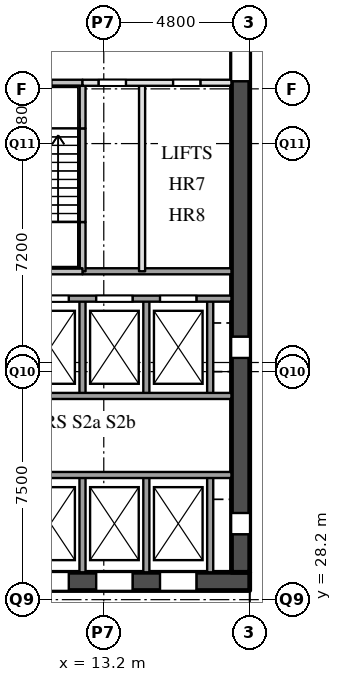
"""IFC4 building model, lengths in metres.
Left out: names, types, materials, properties, quantities, classifications, styles, units other than length and angle.
Written with IfcOpenShell. Run it as: python <this file> out.ifc"""

import sys

from ifc_helpers import new_model, si_unit, direction, frame, frame_2d, origin, place, context, subcontext, project, spatial, rectangle, extrude, element, fill, save


model = new_model("IFC4")
c1 = context("Model", 3, precision=1e-05, world=origin(), true_north=direction((0.0, 1.0)))
c2 = subcontext(c1, "Body", "Model", "MODEL_VIEW")
j1 = project(units=[si_unit("LENGTHUNIT", "METRE"), si_unit("PLANEANGLEUNIT", "RADIAN")], contexts=[c1])
p1 = place(None, origin())
s1 = spatial("IfcSite", under=j1, at=p1, CompositionType="ELEMENT")
p2 = place(p1, origin())
s2 = spatial("IfcBuilding", under=s1, at=p2, CompositionType="ELEMENT")
p3 = place(p2, origin())
s3 = spatial("IfcBuildingStorey", under=s2, at=p3, CompositionType="ELEMENT", Elevation=0.0)
p4 = place(p3, frame((5.6, 28.8, 0.0), z_axis=(0.0, 0.0, 1.0), x_axis=(1.0, 0.0, 0.0)))
e1 = element("IfcWall", 1, at=p4, inside=s3, PredefinedType="SHEAR", context=c2, shape_type="SweptSolid", body=[
    extrude(rectangle(XDim=12.4, YDim=0.6, at=frame_2d((6.2, 0.0))), origin(), (0.0, 0.0, 1.0), 7.59),
])
p5 = place(p4, frame((1.05, 0.0, 0.0)))
e2 = element("IfcOpeningElement", 2, at=p5, cuts=e1, PredefinedType="OPENING", context=c2, shape_type="SweptSolid", body=[
    extrude(rectangle(XDim=1.2, YDim=2.1, at=frame_2d((0.6, 1.05))), frame((0.0, 0.31, 0.0), z_axis=(0.0, -1.0, 0.0), x_axis=(1.0, 0.0, 0.0)), (0.0, 0.0, 1.0), 0.62),
])
p6 = place(p4, frame((5.25, 0.0, 0.0)))
e3 = element("IfcOpeningElement", 3, at=p6, cuts=e1, PredefinedType="OPENING", context=c2, shape_type="SweptSolid", body=[
    extrude(rectangle(XDim=1.2, YDim=2.1, at=frame_2d((0.6, 1.05))), frame((0.0, 0.31, 0.0), z_axis=(0.0, -1.0, 0.0), x_axis=(1.0, 0.0, 0.0)), (0.0, 0.0, 1.0), 0.62),
])
p7 = place(p4, frame((7.35, 0.0, 0.0)))
e4 = element("IfcOpeningElement", 4, at=p7, cuts=e1, PredefinedType="OPENING", context=c2, shape_type="SweptSolid", body=[
    extrude(rectangle(XDim=1.2, YDim=2.1, at=frame_2d((0.6, 1.05))), frame((0.0, 0.31, 0.0), z_axis=(0.0, -1.0, 0.0), x_axis=(1.0, 0.0, 0.0)), (0.0, 0.0, 1.0), 0.62),
])
p8 = place(p4, frame((9.45, 0.0, 0.0)))
e5 = element("IfcOpeningElement", 5, at=p8, cuts=e1, PredefinedType="OPENING", context=c2, shape_type="SweptSolid", body=[
    extrude(rectangle(XDim=1.2, YDim=2.1, at=frame_2d((0.6, 1.05))), frame((0.0, 0.31, 0.0), z_axis=(0.0, -1.0, 0.0), x_axis=(1.0, 0.0, 0.0)), (0.0, 0.0, 1.0), 0.62),
])
p9 = place(p3, frame((17.7, 29.1, 0.0), z_axis=(0.0, 0.0, 1.0), x_axis=(0.0, 1.0, 0.0)))
e6 = element("IfcWall", 6, at=p9, inside=s3, PredefinedType="SHEAR", context=c2, shape_type="SweptSolid", body=[
    extrude(rectangle(XDim=20.3, YDim=0.6, at=frame_2d((10.15, 0.0))), origin(), (0.0, 0.0, 1.0), 7.59),
])
p10 = place(p9, frame((1.25, 0.0, 0.0)))
e7 = element("IfcOpeningElement", 7, at=p10, cuts=e6, PredefinedType="OPENING", context=c2, shape_type="SweptSolid", body=[
    extrude(rectangle(XDim=0.7, YDim=2.1, at=frame_2d((0.35, 1.05))), frame((0.0, 0.31, 0.0), z_axis=(0.0, -1.0, 0.0), x_axis=(1.0, 0.0, 0.0)), (0.0, 0.0, 1.0), 0.62),
])
p11 = place(p9, frame((7.05, 0.0, 0.0)))
e8 = element("IfcOpeningElement", 8, at=p11, cuts=e6, PredefinedType="OPENING", context=c2, shape_type="SweptSolid", body=[
    extrude(rectangle(XDim=0.7, YDim=2.1, at=frame_2d((0.35, 1.05))), frame((0.0, 0.31, 0.0), z_axis=(0.0, -1.0, 0.0), x_axis=(1.0, 0.0, 0.0)), (0.0, 0.0, 1.0), 0.62),
])
p12 = place(p9, frame((17.95, 0.0, 0.0), z_axis=(0.0, 0.0, 1.0), x_axis=(-1.0, 0.0, 0.0)))
e9 = element("IfcOpeningElement", 9, at=p12, cuts=e6, PredefinedType="OPENING", context=c2, shape_type="SweptSolid", body=[
    extrude(rectangle(XDim=1.8, YDim=2.4, at=frame_2d((0.9, 1.2))), frame((0.0, 0.31, 0.0), z_axis=(0.0, -1.0, 0.0), x_axis=(1.0, 0.0, 0.0)), (0.0, 0.0, 1.0), 0.62),
])
p13 = place(p9, frame((19.85, 0.0, 0.0), z_axis=(0.0, 0.0, 1.0), x_axis=(-1.0, 0.0, 0.0)))
e10 = element("IfcOpeningElement", 10, at=p13, cuts=e6, PredefinedType="OPENING", context=c2, shape_type="SweptSolid", body=[
    extrude(rectangle(XDim=1.8, YDim=2.4, at=frame_2d((0.9, 1.2))), frame((0.0, 0.31, 0.0), z_axis=(0.0, -1.0, 0.0), x_axis=(1.0, 0.0, 0.0)), (0.0, 0.0, 1.0), 0.62),
])
p14 = place(p3, frame((12.5, 29.1, 0.0), z_axis=(0.0, 0.0, 1.0), x_axis=(0.0, 1.0, 0.0)))
e11 = element("IfcWall", 11, at=p14, inside=s3, PredefinedType="SOLIDWALL", context=c2, shape_type="SweptSolid", body=[
    extrude(rectangle(XDim=3.2, YDim=0.2, at=frame_2d((1.6, 0.0))), origin(), (0.0, 0.0, 1.0), 7.59),
])
p15 = place(p3, frame((12.5, 34.9, 0.0), z_axis=(0.0, 0.0, 1.0), x_axis=(0.0, 1.0, 0.0)))
e12 = element("IfcWall", 12, at=p15, inside=s3, PredefinedType="SOLIDWALL", context=c2, shape_type="SweptSolid", body=[
    extrude(rectangle(XDim=3.2, YDim=0.2, at=frame_2d((1.6, 0.0))), origin(), (0.0, 0.0, 1.0), 7.59),
])
p16 = place(p3, frame((12.5, 39.0, 0.0), z_axis=(0.0, 0.0, 1.0), x_axis=(0.0, 1.0, 0.0)))
e13 = element("IfcWall", 13, at=p16, inside=s3, PredefinedType="SOLIDWALL", context=c2, shape_type="SweptSolid", body=[
    extrude(rectangle(XDim=1.62, YDim=0.2, at=frame_2d((0.81, 0.0))), origin(), (0.0, 0.0, 1.0), 7.59),
])
p17 = place(p3, frame((12.5, 40.62, 0.0), z_axis=(0.0, 0.0, 1.0), x_axis=(0.0, 1.0, 0.0)))
e14 = element("IfcWall", 14, at=p17, inside=s3, PredefinedType="SOLIDWALL", context=c2, shape_type="SweptSolid", body=[
    extrude(rectangle(XDim=3.08, YDim=0.2, at=frame_2d((1.54, 0.0))), origin(), (0.0, 0.0, 1.0), 7.59),
])
p18 = place(p3, frame((12.5, 43.7, 0.0), z_axis=(0.0, 0.0, 1.0), x_axis=(0.0, 1.0, 0.0)))
e15 = element("IfcWall", 15, at=p18, inside=s3, PredefinedType="SOLIDWALL", context=c2, shape_type="SweptSolid", body=[
    extrude(rectangle(XDim=1.5, YDim=0.2, at=frame_2d((0.75, 0.0))), origin(), (0.0, 0.0, 1.0), 7.59),
])
p19 = place(p3, frame((14.46, 39.0, 0.0), z_axis=(0.0, 0.0, 1.0), x_axis=(0.0, 1.0, 0.0)))
e16 = element("IfcWall", 16, at=p19, inside=s3, PredefinedType="PARTITIONING", context=c2, shape_type="SweptSolid", body=[
    extrude(rectangle(XDim=6.2, YDim=0.2, at=frame_2d((3.1, 0.0))), origin(), (0.0, 0.0, 1.0), 7.59),
])
p20 = place(p3, frame((14.6, 29.1, 0.0), z_axis=(0.0, 0.0, 1.0), x_axis=(0.0, 1.0, 0.0)))
e17 = element("IfcWall", 17, at=p20, inside=s3, PredefinedType="SOLIDWALL", context=c2, shape_type="SweptSolid", body=[
    extrude(rectangle(XDim=3.2, YDim=0.2, at=frame_2d((1.6, 0.0))), origin(), (0.0, 0.0, 1.0), 7.59),
])
p21 = place(p3, frame((14.6, 34.9, 0.0), z_axis=(0.0, 0.0, 1.0), x_axis=(0.0, 1.0, 0.0)))
e18 = element("IfcWall", 18, at=p21, inside=s3, PredefinedType="SOLIDWALL", context=c2, shape_type="SweptSolid", body=[
    extrude(rectangle(XDim=3.2, YDim=0.2, at=frame_2d((1.6, 0.0))), origin(), (0.0, 0.0, 1.0), 7.59),
])
p22 = place(p3, frame((16.7, 29.1, 0.0), z_axis=(0.0, 0.0, 1.0), x_axis=(0.0, 1.0, 0.0)))
e19 = element("IfcWall", 19, at=p22, inside=s3, PredefinedType="SOLIDWALL", context=c2, shape_type="SweptSolid", body=[
    extrude(rectangle(XDim=3.2, YDim=0.2, at=frame_2d((1.6, 0.0))), origin(), (0.0, 0.0, 1.0), 7.59),
])
p23 = place(p3, frame((16.7, 34.9, 0.0), z_axis=(0.0, 0.0, 1.0), x_axis=(0.0, 1.0, 0.0)))
e20 = element("IfcWall", 20, at=p23, inside=s3, PredefinedType="SOLIDWALL", context=c2, shape_type="SweptSolid", body=[
    extrude(rectangle(XDim=3.2, YDim=0.2, at=frame_2d((1.6, 0.0))), origin(), (0.0, 0.0, 1.0), 7.59),
])
p24 = place(p3, frame((6.2, 32.3, 0.0), z_axis=(0.0, 0.0, 1.0), x_axis=(1.0, 0.0, 0.0)))
e21 = element("IfcWall", 21, at=p24, inside=s3, PredefinedType="SOLIDWALL", context=c2, shape_type="SweptSolid", body=[
    extrude(rectangle(XDim=11.2, YDim=0.2, at=frame_2d((5.6, 0.0))), origin(), (0.0, 0.0, 1.0), 7.59),
])
p25 = place(p24, frame((2.55, 0.0, 0.0)))
e22 = element("IfcOpeningElement", 22, at=p25, cuts=e21, PredefinedType="OPENING", context=c2, shape_type="SweptSolid", body=[
    extrude(rectangle(XDim=1.2, YDim=2.1, at=frame_2d((0.6, 1.05))), frame((0.0, 0.11, 0.0), z_axis=(0.0, -1.0, 0.0), x_axis=(1.0, 0.0, 0.0)), (0.0, 0.0, 1.0), 0.22),
])
p26 = place(p3, frame((6.2, 34.9, 0.0), z_axis=(0.0, 0.0, 1.0), x_axis=(1.0, 0.0, 0.0)))
e23 = element("IfcWall", 23, at=p26, inside=s3, PredefinedType="SOLIDWALL", context=c2, shape_type="SweptSolid", body=[
    extrude(rectangle(XDim=11.2, YDim=0.2, at=frame_2d((5.6, 0.0))), origin(), (0.0, 0.0, 1.0), 7.59),
])
p27 = place(p3, frame((6.2, 38.1, 0.0), z_axis=(0.0, 0.0, 1.0), x_axis=(1.0, 0.0, 0.0)))
e24 = element("IfcWall", 24, at=p27, inside=s3, PredefinedType="SOLIDWALL", context=c2, shape_type="SweptSolid", body=[
    extrude(rectangle(XDim=11.2, YDim=0.2, at=frame_2d((5.6, 0.0))), origin(), (0.0, 0.0, 1.0), 7.59),
])
p28 = place(p27, frame((0.45, 0.0, 0.0)))
e25 = element("IfcOpeningElement", 25, at=p28, cuts=e24, PredefinedType="OPENING", context=c2, shape_type="SweptSolid", body=[
    extrude(rectangle(XDim=1.2, YDim=2.1, at=frame_2d((0.6, 1.05))), frame((0.0, 0.11, 0.0), z_axis=(0.0, -1.0, 0.0), x_axis=(1.0, 0.0, 0.0)), (0.0, 0.0, 1.0), 0.22),
])
p29 = place(p27, frame((2.55, 0.0, 0.0)))
e26 = element("IfcOpeningElement", 26, at=p29, cuts=e24, PredefinedType="OPENING", context=c2, shape_type="SweptSolid", body=[
    extrude(rectangle(XDim=1.2, YDim=2.1, at=frame_2d((0.6, 1.05))), frame((0.0, 0.11, 0.0), z_axis=(0.0, -1.0, 0.0), x_axis=(1.0, 0.0, 0.0)), (0.0, 0.0, 1.0), 0.22),
])
p30 = place(p27, frame((4.65, 0.0, 0.0)))
e27 = element("IfcOpeningElement", 27, at=p30, cuts=e24, PredefinedType="OPENING", context=c2, shape_type="SweptSolid", body=[
    extrude(rectangle(XDim=1.2, YDim=2.1, at=frame_2d((0.6, 1.05))), frame((0.0, 0.11, 0.0), z_axis=(0.0, -1.0, 0.0), x_axis=(1.0, 0.0, 0.0)), (0.0, 0.0, 1.0), 0.22),
])
p31 = place(p27, frame((6.75, 0.0, 0.0)))
e28 = element("IfcOpeningElement", 28, at=p31, cuts=e24, PredefinedType="OPENING", context=c2, shape_type="SweptSolid", body=[
    extrude(rectangle(XDim=1.2, YDim=2.1, at=frame_2d((0.6, 1.05))), frame((0.0, 0.11, 0.0), z_axis=(0.0, -1.0, 0.0), x_axis=(1.0, 0.0, 0.0)), (0.0, 0.0, 1.0), 0.22),
])
p32 = place(p27, frame((8.85, 0.0, 0.0)))
e29 = element("IfcOpeningElement", 29, at=p32, cuts=e24, PredefinedType="OPENING", context=c2, shape_type="SweptSolid", body=[
    extrude(rectangle(XDim=1.2, YDim=2.1, at=frame_2d((0.6, 1.05))), frame((0.0, 0.11, 0.0), z_axis=(0.0, -1.0, 0.0), x_axis=(1.0, 0.0, 0.0)), (0.0, 0.0, 1.0), 0.22),
])
p33 = place(p3, frame((12.5, 39.0, 0.0), z_axis=(0.0, 0.0, 1.0), x_axis=(1.0, 0.0, 0.0)))
e30 = element("IfcWall", 30, at=p33, inside=s3, PredefinedType="SOLIDWALL", context=c2, shape_type="SweptSolid", body=[
    extrude(rectangle(XDim=4.9, YDim=0.2, at=frame_2d((2.45, 0.0))), origin(), (0.0, 0.0, 1.0), 7.59),
])
p34 = place(p3, frame((9.45, 39.0, 0.0), z_axis=(0.0, 0.0, 1.0), x_axis=(1.0, 0.0, 0.0)))
e31 = element("IfcWall", 31, at=p34, inside=s3, PredefinedType="SOLIDWALL", context=c2, shape_type="SweptSolid", body=[
    extrude(rectangle(XDim=3.05, YDim=0.2, at=frame_2d((1.525, 0.0))), origin(), (0.0, 0.0, 1.0), 7.59),
])
p35 = place(p3, frame((12.5, 45.2, 0.0), z_axis=(0.0, 0.0, 1.0), x_axis=(1.0, 0.0, 0.0)))
e32 = element("IfcWall", 32, at=p35, inside=s3, PredefinedType="PARTITIONING", context=c2, shape_type="SweptSolid", body=[
    extrude(rectangle(XDim=4.9, YDim=0.2, at=frame_2d((2.45, 0.0))), origin(), (0.0, 0.0, 1.0), 7.59),
])
p36 = place(p35, frame((0.53, 0.0, 0.0)))
e33 = element("IfcOpeningElement", 33, at=p36, cuts=e32, PredefinedType="OPENING", context=c2, shape_type="SweptSolid", body=[
    extrude(rectangle(XDim=0.9, YDim=2.1, at=frame_2d((0.45, 1.05))), frame((0.0, 0.11, 0.0), z_axis=(0.0, -1.0, 0.0), x_axis=(1.0, 0.0, 0.0)), (0.0, 0.0, 1.0), 0.22),
])
p37 = place(p35, frame((2.98, 0.0, 0.0)))
e34 = element("IfcOpeningElement", 34, at=p37, cuts=e32, PredefinedType="OPENING", context=c2, shape_type="SweptSolid", body=[
    extrude(rectangle(XDim=0.9, YDim=2.1, at=frame_2d((0.45, 1.05))), frame((0.0, 0.11, 0.0), z_axis=(0.0, -1.0, 0.0), x_axis=(1.0, 0.0, 0.0)), (0.0, 0.0, 1.0), 0.22),
])
p38 = place(p3, frame((9.45, 45.2, 0.0), z_axis=(0.0, 0.0, 1.0), x_axis=(1.0, 0.0, 0.0)))
e35 = element("IfcWall", 35, at=p38, inside=s3, PredefinedType="SOLIDWALL", context=c2, shape_type="SweptSolid", body=[
    extrude(rectangle(XDim=3.05, YDim=0.2, at=frame_2d((1.525, 0.0))), origin(), (0.0, 0.0, 1.0), 7.59),
])
p39 = place(p38, frame((0.925, 0.0, 0.0)))
e36 = element("IfcOpeningElement", 36, at=p39, cuts=e35, PredefinedType="OPENING", context=c2, shape_type="SweptSolid", body=[
    extrude(rectangle(XDim=1.1, YDim=2.1, at=frame_2d((0.55, 1.05))), frame((0.0, 0.11, 0.0), z_axis=(0.0, -1.0, 0.0), x_axis=(1.0, 0.0, 0.0)), (0.0, 0.0, 1.0), 0.22),
])
p40 = place(p6, origin())
e37 = element("IfcDoor", 37, at=p40, inside=s3, OperationType="SLIDING_TO_LEFT", PredefinedType="DOOR", context=c2, shape_type="SweptSolid", body=[
    extrude(rectangle(XDim=1.2, YDim=2.1, at=frame_2d((0.6, 1.05))), frame((0.0, 0.025, 0.0), z_axis=(0.0, -1.0, 0.0), x_axis=(1.0, 0.0, 0.0)), (0.0, 0.0, 1.0), 0.05),
])
fill(e3, e37)
p41 = place(p7, origin())
e38 = element("IfcDoor", 38, at=p41, inside=s3, OperationType="SLIDING_TO_LEFT", PredefinedType="DOOR", context=c2, shape_type="SweptSolid", body=[
    extrude(rectangle(XDim=1.2, YDim=2.1, at=frame_2d((0.6, 1.05))), frame((0.0, 0.025, 0.0), z_axis=(0.0, -1.0, 0.0), x_axis=(1.0, 0.0, 0.0)), (0.0, 0.0, 1.0), 0.05),
])
fill(e4, e38)
p42 = place(p30, origin())
e39 = element("IfcDoor", 39, at=p42, inside=s3, OperationType="SLIDING_TO_LEFT", PredefinedType="DOOR", context=c2, shape_type="SweptSolid", body=[
    extrude(rectangle(XDim=1.2, YDim=2.1, at=frame_2d((0.6, 1.05))), frame((0.0, 0.025, 0.0), z_axis=(0.0, -1.0, 0.0), x_axis=(1.0, 0.0, 0.0)), (0.0, 0.0, 1.0), 0.05),
])
fill(e27, e39)
p43 = place(p31, origin())
e40 = element("IfcDoor", 40, at=p43, inside=s3, OperationType="SLIDING_TO_LEFT", PredefinedType="DOOR", context=c2, shape_type="SweptSolid", body=[
    extrude(rectangle(XDim=1.2, YDim=2.1, at=frame_2d((0.6, 1.05))), frame((0.0, 0.025, 0.0), z_axis=(0.0, -1.0, 0.0), x_axis=(1.0, 0.0, 0.0)), (0.0, 0.0, 1.0), 0.05),
])
fill(e28, e40)
p44 = place(p8, origin())
e41 = element("IfcDoor", 41, at=p44, inside=s3, OperationType="SLIDING_TO_LEFT", PredefinedType="DOOR", context=c2, shape_type="SweptSolid", body=[
    extrude(rectangle(XDim=1.2, YDim=2.1, at=frame_2d((0.6, 1.05))), frame((0.0, 0.025, 0.0), z_axis=(0.0, -1.0, 0.0), x_axis=(1.0, 0.0, 0.0)), (0.0, 0.0, 1.0), 0.05),
])
fill(e5, e41)
p45 = place(p32, origin())
e42 = element("IfcDoor", 42, at=p45, inside=s3, OperationType="SLIDING_TO_LEFT", PredefinedType="DOOR", context=c2, shape_type="SweptSolid", body=[
    extrude(rectangle(XDim=1.2, YDim=2.1, at=frame_2d((0.6, 1.05))), frame((0.0, 0.025, 0.0), z_axis=(0.0, -1.0, 0.0), x_axis=(1.0, 0.0, 0.0)), (0.0, 0.0, 1.0), 0.05),
])
fill(e29, e42)
p46 = place(p10, origin())
e43 = element("IfcDoor", 43, at=p46, inside=s3, OperationType="SINGLE_SWING_LEFT", PredefinedType="DOOR", context=c2, shape_type="SweptSolid", body=[
    extrude(rectangle(XDim=0.7, YDim=2.1, at=frame_2d((0.35, 1.05))), frame((0.0, 0.025, 0.0), z_axis=(0.0, -1.0, 0.0), x_axis=(1.0, 0.0, 0.0)), (0.0, 0.0, 1.0), 0.05),
])
fill(e7, e43)
p47 = place(p11, origin())
e44 = element("IfcDoor", 44, at=p47, inside=s3, OperationType="SINGLE_SWING_LEFT", PredefinedType="DOOR", context=c2, shape_type="SweptSolid", body=[
    extrude(rectangle(XDim=0.7, YDim=2.1, at=frame_2d((0.35, 1.05))), frame((0.0, 0.025, 0.0), z_axis=(0.0, -1.0, 0.0), x_axis=(1.0, 0.0, 0.0)), (0.0, 0.0, 1.0), 0.05),
])
fill(e8, e44)
p48 = place(p36, origin())
e45 = element("IfcDoor", 45, at=p48, inside=s3, OperationType="SINGLE_SWING_LEFT", PredefinedType="DOOR", context=c2, shape_type="SweptSolid", body=[
    extrude(rectangle(XDim=0.9, YDim=2.1, at=frame_2d((0.45, 1.05))), frame((0.0, 0.025, 0.0), z_axis=(0.0, -1.0, 0.0), x_axis=(1.0, 0.0, 0.0)), (0.0, 0.0, 1.0), 0.05),
])
fill(e33, e45)
p49 = place(p37, origin())
e46 = element("IfcDoor", 46, at=p49, inside=s3, OperationType="SINGLE_SWING_RIGHT", PredefinedType="DOOR", context=c2, shape_type="SweptSolid", body=[
    extrude(rectangle(XDim=0.9, YDim=2.1, at=frame_2d((0.45, 1.05))), frame((0.0, 0.025, 0.0), z_axis=(0.0, -1.0, 0.0), x_axis=(1.0, 0.0, 0.0)), (0.0, 0.0, 1.0), 0.05),
])
fill(e34, e46)
p50 = place(p12, origin())
e47 = element("IfcDoor", 47, at=p50, inside=s3, OperationType="DOUBLE_DOOR_SINGLE_SWING", PredefinedType="DOOR", context=c2, shape_type="SweptSolid", body=[
    extrude(rectangle(XDim=1.8, YDim=2.4, at=frame_2d((0.9, 1.2))), frame((0.0, 0.025, 0.0), z_axis=(0.0, -1.0, 0.0), x_axis=(1.0, 0.0, 0.0)), (0.0, 0.0, 1.0), 0.05),
])
fill(e9, e47)
save(model, sys.argv[1])
